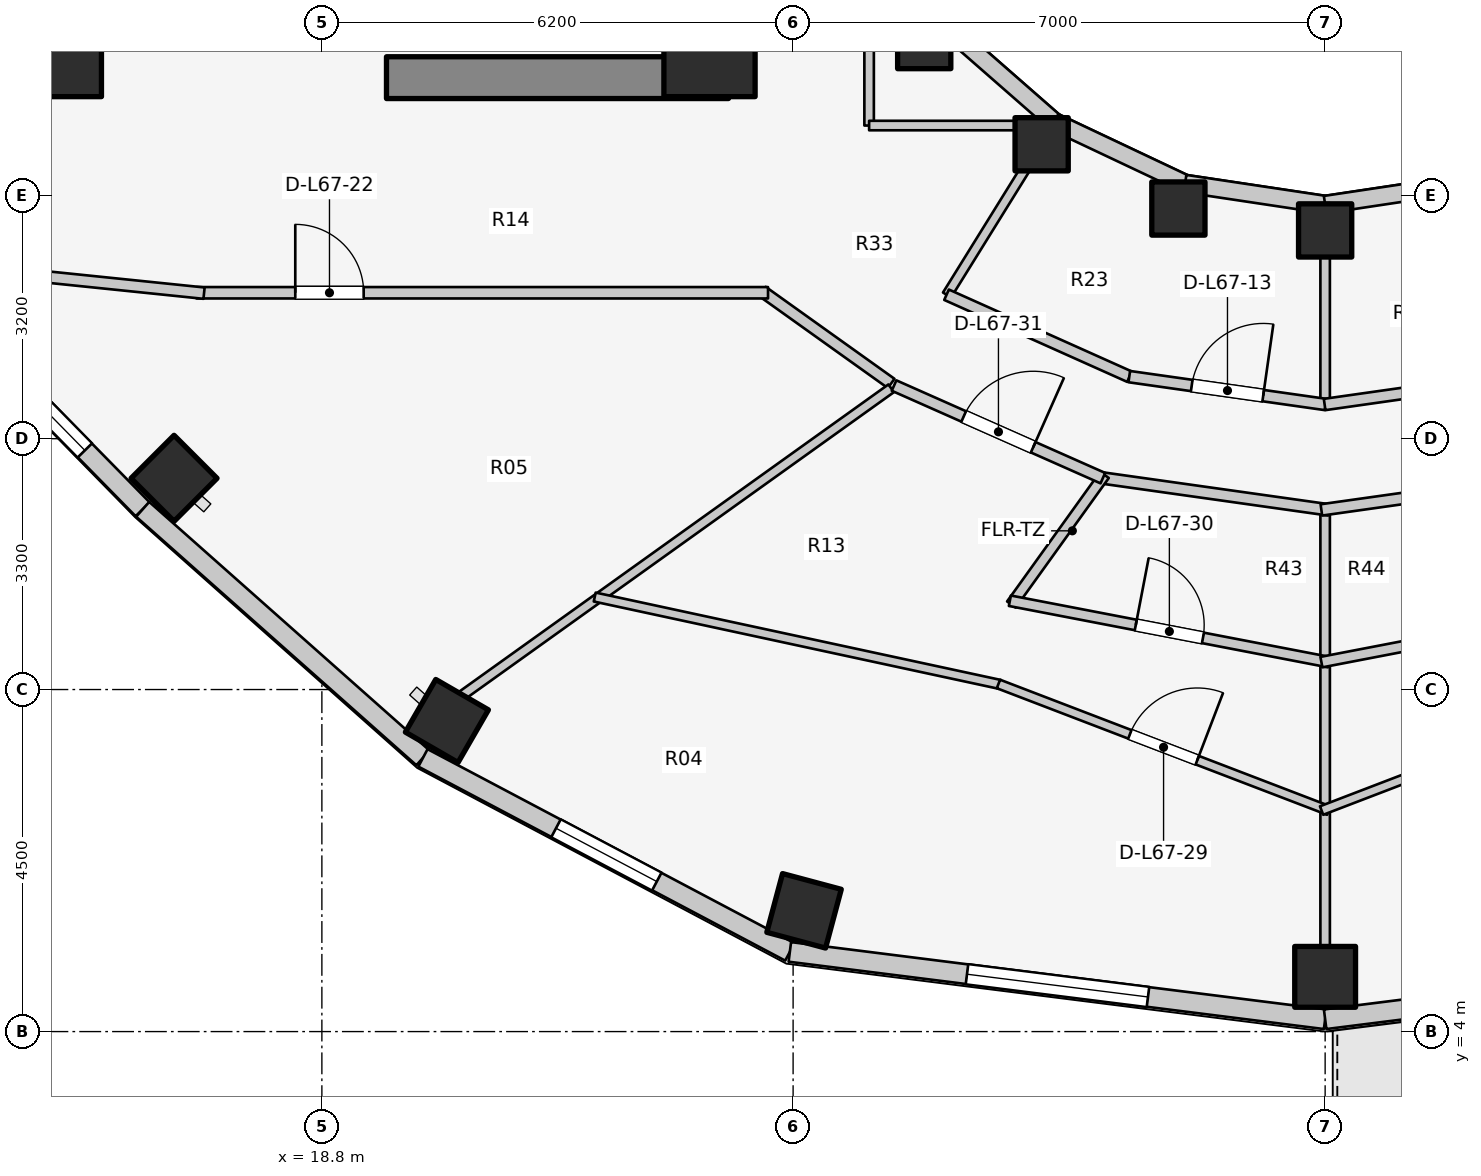
"""IFC4 building model, lengths in metres.
Left out: names, types, materials, properties, quantities, classifications, styles, units other than length and angle.
Written with IfcOpenShell. Run it as: python <this file> out.ifc"""

import sys

from ifc_helpers import new_model, si_unit, direction, frame, frame_2d, origin, origin_2d, place, context, subcontext, project, spatial, rectangle, extrude, element, fill, save


model = new_model("IFC4")
c1 = context("Model", 3, precision=1e-05, world=origin(), true_north=direction((0.0, 1.0)))
c2 = subcontext(c1, "Body", "Model", "MODEL_VIEW")
j1 = project(units=[si_unit("LENGTHUNIT", "METRE"), si_unit("PLANEANGLEUNIT", "RADIAN")], contexts=[c1])
p1 = place(None, origin())
s1 = spatial("IfcSite", under=j1, at=p1, CompositionType="ELEMENT")
p2 = place(p1, origin())
s2 = spatial("IfcBuilding", under=s1, at=p2, CompositionType="ELEMENT")
p3 = place(p2, frame((0.0, 0.0, 220.2)))
s3 = spatial("IfcBuildingStorey", under=s2, at=p3, CompositionType="ELEMENT", Elevation=220.2)
p4 = place(p3, frame((19.65, 16.55, 0.0), z_axis=(0.0, 0.0, 1.0), x_axis=(1.0, 0.0, 0.0)))
e1 = element("IfcWall", 1, at=p4, inside=s3, PredefinedType="SHEAR", context=c2, shape_type="SweptSolid", body=[
    extrude(rectangle(XDim=4.5, YDim=0.55, at=frame_2d((2.25, 0.0))), origin(), (0.0, 0.0, 1.0), 3.1),
])
for number, where, z_axis, x_axis in (
    (2, (15.3, 16.9, 0.0), (0.0, 0.0, 1.0), (1.0, 0.0, 0.0)),
    (3, (23.9, 16.9, 0.0), (0.0, 0.0, 1.0), (1.0, 0.0, 0.0)),
):
    element("IfcColumn", number, at=place(p3, frame(where, z_axis=z_axis, x_axis=x_axis)), inside=s3, PredefinedType="COLUMN", context=c2, shape_type="SweptSolid", body=[
        extrude(rectangle(XDim=1.2, YDim=1.2, at=origin_2d()), origin(), (0.0, 0.0, 1.0), 3.1),
    ])
p5 = place(p3, frame((26.725, 17.018, 0.0), z_axis=(0.0, 0.0, 1.0), x_axis=(1.0, 0.0, 0.0)))
e4 = element("IfcColumn", 4, at=p5, inside=s3, PredefinedType="COLUMN", context=c2, shape_type="SweptSolid", body=[
    extrude(rectangle(XDim=0.7, YDim=0.7, at=origin_2d()), origin(), (0.0, 0.0, 1.0), 3.1),
])
p6 = place(p3, frame((16.855, 11.279, 0.0), z_axis=(0.0, 0.0, 1.0), x_axis=(-0.707106781187, -0.707106781187, 0.0)))
e5 = element("IfcColumn", 5, at=p6, inside=s3, PredefinedType="COLUMN", context=c2, shape_type="SweptSolid", body=[
    extrude(rectangle(XDim=0.8, YDim=0.8, at=origin_2d()), origin(), (0.0, 0.0, 1.0), 3.1),
])
p7 = place(p3, frame((28.27, 15.673, 0.0), z_axis=(0.0, 0.0, 1.0), x_axis=(1.0, 0.0, 0.0)))
e6 = element("IfcColumn", 6, at=p7, inside=s3, PredefinedType="COLUMN", context=c2, shape_type="SweptSolid", body=[
    extrude(rectangle(XDim=0.7, YDim=0.7, at=origin_2d()), origin(), (0.0, 0.0, 1.0), 3.1),
])
p8 = place(p3, frame((20.445, 8.086, 0.0), z_axis=(0.0, 0.0, 1.0), x_axis=(-0.5, -0.866025403784, 0.0)))
e7 = element("IfcColumn", 7, at=p8, inside=s3, PredefinedType="COLUMN", context=c2, shape_type="SweptSolid", body=[
    extrude(rectangle(XDim=0.8, YDim=0.8, at=origin_2d()), origin(), (0.0, 0.0, 1.0), 3.1),
])
p9 = place(p3, frame((30.069, 14.828, 0.0), z_axis=(0.0, 0.0, 1.0), x_axis=(1.0, 0.0, 0.0)))
e8 = element("IfcColumn", 8, at=p9, inside=s3, PredefinedType="COLUMN", context=c2, shape_type="SweptSolid", body=[
    extrude(rectangle(XDim=0.7, YDim=0.7, at=origin_2d()), origin(), (0.0, 0.0, 1.0), 3.1),
])
p10 = place(p3, frame((25.144, 5.589, 0.0), z_axis=(0.0, 0.0, 1.0), x_axis=(-0.258819045103, -0.965925826289, 0.0)))
e9 = element("IfcColumn", 9, at=p10, inside=s3, PredefinedType="COLUMN", context=c2, shape_type="SweptSolid", body=[
    extrude(rectangle(XDim=0.8, YDim=0.8, at=origin_2d()), origin(), (0.0, 0.0, 1.0), 3.1),
])
p11 = place(p3, frame((32.0, 14.54, 0.0), z_axis=(0.0, 0.0, 1.0), x_axis=(1.0, 0.0, 0.0)))
e10 = element("IfcColumn", 10, at=p11, inside=s3, PredefinedType="COLUMN", context=c2, shape_type="SweptSolid", body=[
    extrude(rectangle(XDim=0.7, YDim=0.7, at=origin_2d()), origin(), (0.0, 0.0, 1.0), 3.1),
])
p12 = place(p3, frame((32.0, 4.72, 0.0), z_axis=(0.0, 0.0, 1.0), x_axis=(0.0, -1.0, 0.0)))
e11 = element("IfcColumn", 11, at=p12, inside=s3, PredefinedType="COLUMN", context=c2, shape_type="SweptSolid", body=[
    extrude(rectangle(XDim=0.8, YDim=0.8, at=origin_2d()), origin(), (0.0, 0.0, 1.0), 3.1),
])
p13 = place(p3, frame((26.965, 17.258, 0.0), z_axis=(0.0, 0.0, 1.0), x_axis=(0.752576694707, -0.658504607869, 0.0)))
e12 = element("IfcWall", 12, at=p13, inside=s3, PredefinedType="STANDARD", context=c2, shape_type="SweptSolid", body=[
    extrude(rectangle(XDim=1.959, YDim=0.23, at=frame_2d((0.98, 0.0))), origin(), (0.0, 0.0, 1.0), 2.16),
])
p14 = place(p3, frame((28.44, 15.968, 0.0), z_axis=(0.0, 0.0, 1.0), x_axis=(0.904179699603, -0.427152280606, 0.0)))
e13 = element("IfcWall", 13, at=p14, inside=s3, PredefinedType="STANDARD", context=c2, shape_type="SweptSolid", body=[
    extrude(rectangle(XDim=1.899, YDim=0.23, at=frame_2d((0.95, 0.0))), origin(), (0.0, 0.0, 1.0), 2.16),
])
for number, where, z_axis, x_axis in (
    (14, (30.157, 15.157, 0.0), (0.0, 0.0, 1.0), (0.989, -0.149, 0.0)),
    (15, (32.0, 14.88, 0.0), (0.0, 0.0, 1.0), (0.989, 0.149, 0.0)),
):
    element("IfcWall", number, at=place(p3, frame(where, z_axis=z_axis, x_axis=x_axis)), inside=s3, PredefinedType="STANDARD", context=c2, shape_type="SweptSolid", body=[
        extrude(rectangle(XDim=1.864, YDim=0.23, at=frame_2d((0.932, 0.0))), origin(), (0.0, 0.0, 1.0), 2.16),
    ])
p15 = place(p3, frame((13.239, 14.133, 0.0), z_axis=(0.0, 0.0, 1.0), x_axis=(0.700642973333, -0.713512034881, 0.0)))
e16 = element("IfcWall", 16, at=p15, inside=s3, PredefinedType="STANDARD", context=c2, shape_type="SweptSolid", body=[
    extrude(rectangle(XDim=4.572, YDim=0.26, at=frame_2d((2.286, 0.0))), origin(), (0.0, 0.0, 1.0), 2.85),
])
p16 = place(p15, frame((1.086, 0.0, 0.75)))
e17 = element("IfcOpeningElement", 17, at=p16, cuts=e16, PredefinedType="OPENING", context=c2, shape_type="SweptSolid", body=[
    extrude(rectangle(XDim=2.4, YDim=1.7, at=frame_2d((1.2, 0.85))), frame((0.0, 0.14, 0.0), z_axis=(0.0, -1.0, 0.0), x_axis=(1.0, 0.0, 0.0)), (0.0, 0.0, 1.0), 0.28),
])
p17 = place(p3, frame((16.442, 10.871, 0.0), z_axis=(0.0, 0.0, 1.0), x_axis=(0.748165854006, -0.663511759428, 0.0)))
e18 = element("IfcWall", 18, at=p17, inside=s3, PredefinedType="STANDARD", context=c2, shape_type="SweptSolid", body=[
    extrude(rectangle(XDim=4.929, YDim=0.26, at=frame_2d((2.464, 0.0))), origin(), (0.0, 0.0, 1.0), 2.85),
])
p18 = place(p3, frame((20.13, 7.601, 0.0), z_axis=(0.0, 0.0, 1.0), x_axis=(0.884000981341, -0.46748504253, 0.0)))
e19 = element("IfcWall", 19, at=p18, inside=s3, PredefinedType="STANDARD", context=c2, shape_type="SweptSolid", body=[
    extrude(rectangle(XDim=5.46, YDim=0.26, at=frame_2d((2.73, 0.0))), origin(), (0.0, 0.0, 1.0), 2.85),
])
p19 = place(p18, frame((1.98, 0.0, 0.75)))
e20 = element("IfcOpeningElement", 20, at=p19, cuts=e19, PredefinedType="OPENING", context=c2, shape_type="SweptSolid", body=[
    extrude(rectangle(XDim=1.5, YDim=1.6, at=frame_2d((0.75, 0.8))), frame((0.0, 0.14, 0.0), z_axis=(0.0, -1.0, 0.0), x_axis=(1.0, 0.0, 0.0)), (0.0, 0.0, 1.0), 0.28),
])
p20 = place(p3, frame((24.957, 5.048, 0.0), z_axis=(0.0, 0.0, 1.0), x_axis=(0.992180211307, -0.124813574142, 0.0)))
e21 = element("IfcWall", 21, at=p20, inside=s3, PredefinedType="STANDARD", context=c2, shape_type="SweptSolid", body=[
    extrude(rectangle(XDim=7.098, YDim=0.26, at=frame_2d((3.549, 0.0))), origin(), (0.0, 0.0, 1.0), 2.85),
])
p21 = place(p20, frame((2.349, 0.0, 0.75)))
e22 = element("IfcOpeningElement", 22, at=p21, cuts=e21, PredefinedType="OPENING", context=c2, shape_type="SweptSolid", body=[
    extrude(rectangle(XDim=2.4, YDim=1.7, at=frame_2d((1.2, 0.85))), frame((0.0, 0.14, 0.0), z_axis=(0.0, -1.0, 0.0), x_axis=(1.0, 0.0, 0.0)), (0.0, 0.0, 1.0), 0.28),
])
p22 = place(p3, frame((32.0, 4.162, 0.0), z_axis=(0.0, 0.0, 1.0), x_axis=(0.992180211307, 0.124813574142, 0.0)))
e23 = element("IfcWall", 23, at=p22, inside=s3, PredefinedType="STANDARD", context=c2, shape_type="SweptSolid", body=[
    extrude(rectangle(XDim=7.098, YDim=0.26, at=frame_2d((3.549, 0.0))), origin(), (0.0, 0.0, 1.0), 2.88),
])
p23 = place(p22, frame((2.649, 0.0, 0.0)))
e24 = element("IfcOpeningElement", 24, at=p23, cuts=e23, PredefinedType="OPENING", context=c2, shape_type="SweptSolid", body=[
    extrude(rectangle(XDim=1.8, YDim=2.35, at=frame_2d((0.9, 1.175))), frame((0.0, 0.14, 0.0), z_axis=(0.0, -1.0, 0.0), x_axis=(1.0, 0.0, 0.0)), (0.0, 0.0, 1.0), 0.28),
])
p24 = place(p3, frame((28.45, 15.985, 0.0), z_axis=(0.0, 0.0, 1.0), x_axis=(-0.527527080983, -0.849538215049, 0.0)))
e25 = element("IfcWall", 25, at=p24, inside=s3, PredefinedType="PARTITIONING", context=c2, shape_type="SweptSolid", body=[
    extrude(rectangle(XDim=2.701, YDim=0.125, at=frame_2d((1.351, 0.0))), origin(), (0.0, 0.0, 1.0), 2.376),
])
p25 = place(p3, frame((32.0, 14.9, 0.0), z_axis=(0.0, 0.0, 1.0), x_axis=(0.0, -1.0, 0.0)))
e26 = element("IfcWall", 26, at=p25, inside=s3, PredefinedType="PARTITIONING", context=c2, shape_type="SweptSolid", body=[
    extrude(rectangle(XDim=2.65, YDim=0.125, at=frame_2d((1.325, 0.0))), origin(), (0.0, 0.0, 1.0), 2.376),
])
p26 = place(p3, frame((27.019, 13.694, 0.0), z_axis=(0.0, 0.0, 1.0), x_axis=(0.912628408652, -0.408790151203, 0.0)))
e27 = element("IfcWall", 27, at=p26, inside=s3, PredefinedType="PARTITIONING", context=c2, shape_type="SweptSolid", body=[
    extrude(rectangle(XDim=2.638, YDim=0.15, at=frame_2d((1.319, 0.0))), origin(), (0.0, 0.0, 1.0), 2.376),
])
p27 = place(p3, frame((29.423, 12.617, 0.0), z_axis=(0.0, 0.0, 1.0), x_axis=(0.990078185178, -0.140517569133, 0.0)))
e28 = element("IfcWall", 28, at=p27, inside=s3, PredefinedType="PARTITIONING", context=c2, shape_type="SweptSolid", body=[
    extrude(rectangle(XDim=2.61, YDim=0.15, at=frame_2d((1.305, 0.0))), origin(), (0.0, 0.0, 1.0), 2.376),
])
p28 = place(p27, frame((0.83, 0.0, 0.0)))
e29 = element("IfcOpeningElement", 29, at=p28, cuts=e28, PredefinedType="OPENING", context=c2, shape_type="SweptSolid", body=[
    extrude(rectangle(XDim=0.95, YDim=2.1, at=frame_2d((0.475, 1.05))), frame((0.0, 0.085, 0.0), z_axis=(0.0, -1.0, 0.0), x_axis=(1.0, 0.0, 0.0)), (0.0, 0.0, 1.0), 0.17),
])
p29 = place(p3, frame((31.993, 12.25, 0.0), z_axis=(0.0, 0.0, 1.0), x_axis=(0.990078185178, 0.140517569133, 0.0)))
e30 = element("IfcWall", 30, at=p29, inside=s3, PredefinedType="PARTITIONING", context=c2, shape_type="SweptSolid", body=[
    extrude(rectangle(XDim=2.61, YDim=0.15, at=frame_2d((1.305, 0.0))), origin(), (0.0, 0.0, 1.0), 2.376),
])
p30 = place(p3, frame((26.0, 15.92, 0.0), z_axis=(0.0, 0.0, 1.0), x_axis=(0.0, 1.0, 0.0)))
e31 = element("IfcWall", 31, at=p30, inside=s3, PredefinedType="PARTITIONING", context=c2, shape_type="SweptSolid", body=[
    extrude(rectangle(XDim=4.28, YDim=0.125, at=frame_2d((2.14, 0.0))), origin(), (0.0, 0.0, 1.0), 2.232),
])
p31 = place(p3, frame((26.0, 15.92, 0.0), z_axis=(0.0, 0.0, 1.0), x_axis=(1.0, 0.0, 0.0)))
e32 = element("IfcWall", 32, at=p31, inside=s3, PredefinedType="PARTITIONING", context=c2, shape_type="SweptSolid", body=[
    extrude(rectangle(XDim=2.6, YDim=0.125, at=frame_2d((1.3, 0.0))), origin(), (0.0, 0.0, 1.0), 2.232),
])
p32 = place(p3, frame((26.29, 12.527, 0.0), z_axis=(0.0, 0.0, 1.0), x_axis=(-0.813780999276, 0.581171648669, 0.0)))
e33 = element("IfcWall", 33, at=p32, inside=s3, PredefinedType="PARTITIONING", context=c2, shape_type="SweptSolid", body=[
    extrude(rectangle(XDim=2.082, YDim=0.15, at=frame_2d((1.041, 0.0))), origin(), (0.0, 0.0, 1.0), 2.376),
])
p33 = place(p3, frame((17.15, 13.72, 0.0), z_axis=(0.0, 0.0, 1.0), x_axis=(1.0, 0.0, 0.0)))
e34 = element("IfcWall", 34, at=p33, inside=s3, PredefinedType="PARTITIONING", context=c2, shape_type="SweptSolid", body=[
    extrude(rectangle(XDim=7.52, YDim=0.15, at=frame_2d((3.76, 0.0))), origin(), (0.0, 0.0, 1.0), 2.376),
])
p34 = place(p33, frame((1.3, 0.0, 0.0)))
e35 = element("IfcOpeningElement", 35, at=p34, cuts=e34, PredefinedType="OPENING", context=c2, shape_type="SweptSolid", body=[
    extrude(rectangle(XDim=0.9, YDim=2.1, at=frame_2d((0.45, 1.05))), frame((0.0, 0.085, 0.0), z_axis=(0.0, -1.0, 0.0), x_axis=(1.0, 0.0, 0.0)), (0.0, 0.0, 1.0), 0.17),
])
p35 = place(p3, frame((17.25, 13.715, 0.0), z_axis=(0.0, 0.0, 1.0), x_axis=(-0.994734711466, 0.102483431859, 0.0)))
e36 = element("IfcWall", 36, at=p35, inside=s3, PredefinedType="PARTITIONING", context=c2, shape_type="SweptSolid", body=[
    extrude(rectangle(XDim=4.047, YDim=0.15, at=frame_2d((2.024, 0.0))), origin(), (0.0, 0.0, 1.0), 2.22),
])
p36 = place(p3, frame((26.29, 12.463, 0.0), z_axis=(0.0, 0.0, 1.0), x_axis=(-0.813163816543, -0.582034885093, 0.0)))
e37 = element("IfcWall", 37, at=p36, inside=s3, PredefinedType="PARTITIONING", context=c2, shape_type="SweptSolid", body=[
    extrude(rectangle(XDim=6.955, YDim=0.125, at=frame_2d((3.477, 0.0))), origin(), (0.0, 0.0, 1.0), 2.376),
])
p37 = place(p3, frame((32.0, 10.815, 0.0), z_axis=(0.0, 0.0, 1.0), x_axis=(0.0, -1.0, 0.0)))
e38 = element("IfcWall", 38, at=p37, inside=s3, PredefinedType="PARTITIONING", context=c2, shape_type="SweptSolid", body=[
    extrude(rectangle(XDim=5.715, YDim=0.125, at=frame_2d((2.857, 0.0))), origin(), (0.0, 0.0, 1.0), 2.376),
])
p38 = place(p3, frame((22.39, 9.717, 0.0), z_axis=(0.0, 0.0, 1.0), x_axis=(0.977534972695, -0.210773283785, 0.0)))
e39 = element("IfcWall", 39, at=p38, inside=s3, PredefinedType="MOVABLE", context=c2, shape_type="SweptSolid", body=[
    extrude(rectangle(XDim=5.453, YDim=0.12, at=frame_2d((2.727, 0.0))), origin(), (0.0, 0.0, 1.0), 2.376),
])
p39 = place(p3, frame((27.702, 8.573, 0.0), z_axis=(0.0, 0.0, 1.0), x_axis=(0.933766866443, -0.357881878744, 0.0)))
e40 = element("IfcWall", 40, at=p39, inside=s3, PredefinedType="MOVABLE", context=c2, shape_type="SweptSolid", body=[
    extrude(rectangle(XDim=4.653, YDim=0.12, at=frame_2d((2.327, 0.0))), origin(), (0.0, 0.0, 1.0), 2.376),
])
p40 = place(p39, frame((1.852, 0.0, 0.0)))
e41 = element("IfcOpeningElement", 41, at=p40, cuts=e40, PredefinedType="OPENING", context=c2, shape_type="SweptSolid", body=[
    extrude(rectangle(XDim=0.95, YDim=2.1, at=frame_2d((0.475, 1.05))), frame((0.0, 0.07, 0.0), z_axis=(0.0, -1.0, 0.0), x_axis=(1.0, 0.0, 0.0)), (0.0, 0.0, 1.0), 0.14),
])
p41 = place(p3, frame((29.018, 11.29, 0.0), z_axis=(0.0, 0.0, 1.0), x_axis=(0.990214091671, -0.13955662885, 0.0)))
e42 = element("IfcWall", 42, at=p41, inside=s3, PredefinedType="PARTITIONING", context=c2, shape_type="SweptSolid", body=[
    extrude(rectangle(XDim=3.062, YDim=0.15, at=frame_2d((1.531, 0.0))), origin(), (0.0, 0.0, 1.0), 2.376),
])
p42 = place(p3, frame((29.097, 11.324, 0.0), z_axis=(0.0, 0.0, 1.0), x_axis=(-0.583259891741, -0.812285601673, 0.0)))
e43 = element("IfcWall", 43, at=p42, inside=s3, PredefinedType="PLUMBINGWALL", context=c2, shape_type="SweptSolid", body=[
    extrude(rectangle(XDim=2.1, YDim=0.14, at=frame_2d((1.05, 0.0))), origin(), (0.0, 0.0, 1.0), 2.385),
])
p43 = place(p3, frame((27.852, 9.668, 0.0), z_axis=(0.0, 0.0, 1.0), x_axis=(0.98198484664, -0.188959680803, 0.0)))
e44 = element("IfcWall", 44, at=p43, inside=s3, PredefinedType="PLUMBINGWALL", context=c2, shape_type="SweptSolid", body=[
    extrude(rectangle(XDim=4.274, YDim=0.14, at=frame_2d((2.137, 0.0))), origin(), (0.0, 0.0, 1.0), 2.376),
])
p44 = place(p43, frame((1.687, 0.0, 0.0)))
e45 = element("IfcOpeningElement", 45, at=p44, cuts=e44, PredefinedType="OPENING", context=c2, shape_type="SweptSolid", body=[
    extrude(rectangle(XDim=0.9, YDim=2.1, at=frame_2d((0.45, 1.05))), frame((0.0, 0.08, 0.0), z_axis=(0.0, -1.0, 0.0), x_axis=(1.0, 0.0, 0.0)), (0.0, 0.0, 1.0), 0.16),
])
p45 = place(p3, frame((26.328, 12.499, 0.0), z_axis=(0.0, 0.0, 1.0), x_axis=(0.914139569865, -0.405399613724, 0.0)))
e46 = element("IfcWall", 46, at=p45, inside=s3, PredefinedType="PARTITIONING", context=c2, shape_type="SweptSolid", body=[
    extrude(rectangle(XDim=3.005, YDim=0.15, at=frame_2d((1.502, 0.0))), origin(), (0.0, 0.0, 1.0), 2.376),
])
p46 = place(p45, frame((1.002, 0.0, 0.0)))
e47 = element("IfcOpeningElement", 47, at=p46, cuts=e46, PredefinedType="OPENING", context=c2, shape_type="SweptSolid", body=[
    extrude(rectangle(XDim=1.0, YDim=2.1, at=frame_2d((0.5, 1.05))), frame((0.0, 0.085, 0.0), z_axis=(0.0, -1.0, 0.0), x_axis=(1.0, 0.0, 0.0)), (0.0, 0.0, 1.0), 0.17),
])
p47 = place(p3, frame((31.953, 6.908, 0.0), z_axis=(0.0, 0.0, 1.0), x_axis=(0.933766866443, 0.357881878744, 0.0)))
e48 = element("IfcWall", 48, at=p47, inside=s3, PredefinedType="MOVABLE", context=c2, shape_type="SweptSolid", body=[
    extrude(rectangle(XDim=4.653, YDim=0.12, at=frame_2d((2.327, 0.0))), origin(), (0.0, 0.0, 1.0), 2.376),
])
p48 = place(p3, frame((31.95, 10.863, 0.0), z_axis=(0.0, 0.0, 1.0), x_axis=(0.990214091671, 0.13955662885, 0.0)))
e49 = element("IfcWall", 49, at=p48, inside=s3, PredefinedType="PARTITIONING", context=c2, shape_type="SweptSolid", body=[
    extrude(rectangle(XDim=3.062, YDim=0.15, at=frame_2d((1.531, 0.0))), origin(), (0.0, 0.0, 1.0), 2.376),
])
p49 = place(p3, frame((31.951, 8.861, 0.0), z_axis=(0.0, 0.0, 1.0), x_axis=(0.98198484664, 0.188959680803, 0.0)))
e50 = element("IfcWall", 50, at=p49, inside=s3, PredefinedType="PLUMBINGWALL", context=c2, shape_type="SweptSolid", body=[
    extrude(rectangle(XDim=4.274, YDim=0.14, at=frame_2d((2.137, 0.0))), origin(), (0.0, 0.0, 1.0), 2.376),
])
p50 = place(p49, frame((1.687, 0.0, 0.0)))
e51 = element("IfcOpeningElement", 51, at=p50, cuts=e50, PredefinedType="OPENING", context=c2, shape_type="SweptSolid", body=[
    extrude(rectangle(XDim=0.9, YDim=2.1, at=frame_2d((0.45, 1.05))), frame((0.0, 0.08, 0.0), z_axis=(0.0, -1.0, 0.0), x_axis=(1.0, 0.0, 0.0)), (0.0, 0.0, 1.0), 0.16),
])
p51 = place(p16, origin())
e52 = element("IfcWindow", 52, at=p51, inside=s3, PartitioningType="SINGLE_PANEL", PredefinedType="WINDOW", context=c2, shape_type="SweptSolid", body=[
    extrude(rectangle(XDim=2.4, YDim=1.7, at=frame_2d((1.2, 0.85))), frame((0.0, 0.03, 0.0), z_axis=(0.0, -1.0, 0.0), x_axis=(1.0, 0.0, 0.0)), (0.0, 0.0, 1.0), 0.06),
])
fill(e17, e52)
p52 = place(p19, origin())
e53 = element("IfcWindow", 53, at=p52, inside=s3, PartitioningType="SINGLE_PANEL", PredefinedType="WINDOW", context=c2, shape_type="SweptSolid", body=[
    extrude(rectangle(XDim=1.5, YDim=1.6, at=frame_2d((0.75, 0.8))), frame((0.0, 0.03, 0.0), z_axis=(0.0, -1.0, 0.0), x_axis=(1.0, 0.0, 0.0)), (0.0, 0.0, 1.0), 0.06),
])
fill(e20, e53)
p53 = place(p21, origin())
e54 = element("IfcWindow", 54, at=p53, inside=s3, PartitioningType="SINGLE_PANEL", PredefinedType="WINDOW", context=c2, shape_type="SweptSolid", body=[
    extrude(rectangle(XDim=2.4, YDim=1.7, at=frame_2d((1.2, 0.85))), frame((0.0, 0.03, 0.0), z_axis=(0.0, -1.0, 0.0), x_axis=(1.0, 0.0, 0.0)), (0.0, 0.0, 1.0), 0.06),
])
fill(e22, e54)
p54 = place(p28, origin())
e55 = element("IfcDoor", 55, at=p54, inside=s3, OperationType="SINGLE_SWING_RIGHT", PredefinedType="DOOR", context=c2, shape_type="SweptSolid", body=[
    extrude(rectangle(XDim=0.95, YDim=2.1, at=frame_2d((0.475, 1.05))), frame((0.0, 0.025, 0.0), z_axis=(0.0, -1.0, 0.0), x_axis=(1.0, 0.0, 0.0)), (0.0, 0.0, 1.0), 0.05),
])
fill(e29, e55)
p55 = place(p34, origin())
e56 = element("IfcDoor", 56, at=p55, inside=s3, OperationType="SINGLE_SWING_LEFT", PredefinedType="DOOR", context=c2, shape_type="SweptSolid", body=[
    extrude(rectangle(XDim=0.9, YDim=2.1, at=frame_2d((0.45, 1.05))), frame((0.0, 0.025, 0.0), z_axis=(0.0, -1.0, 0.0), x_axis=(1.0, 0.0, 0.0)), (0.0, 0.0, 1.0), 0.05),
])
fill(e35, e56)
p56 = place(p40, origin())
e57 = element("IfcDoor", 57, at=p56, inside=s3, OperationType="SINGLE_SWING_RIGHT", PredefinedType="DOOR", context=c2, shape_type="SweptSolid", body=[
    extrude(rectangle(XDim=0.95, YDim=2.1, at=frame_2d((0.475, 1.05))), frame((0.0, 0.025, 0.0), z_axis=(0.0, -1.0, 0.0), x_axis=(1.0, 0.0, 0.0)), (0.0, 0.0, 1.0), 0.05),
])
fill(e41, e57)
p57 = place(p44, origin())
e58 = element("IfcDoor", 58, at=p57, inside=s3, OperationType="SINGLE_SWING_LEFT", PredefinedType="DOOR", context=c2, shape_type="SweptSolid", body=[
    extrude(rectangle(XDim=0.9, YDim=2.1, at=frame_2d((0.45, 1.05))), frame((0.0, 0.025, 0.0), z_axis=(0.0, -1.0, 0.0), x_axis=(1.0, 0.0, 0.0)), (0.0, 0.0, 1.0), 0.05),
])
fill(e45, e58)
p58 = place(p46, origin())
e59 = element("IfcDoor", 59, at=p58, inside=s3, OperationType="SINGLE_SWING_RIGHT", PredefinedType="DOOR", context=c2, shape_type="SweptSolid", body=[
    extrude(rectangle(XDim=1.0, YDim=2.1, at=frame_2d((0.5, 1.05))), frame((0.0, 0.025, 0.0), z_axis=(0.0, -1.0, 0.0), x_axis=(1.0, 0.0, 0.0)), (0.0, 0.0, 1.0), 0.05),
])
fill(e47, e59)
save(model, sys.argv[1])
